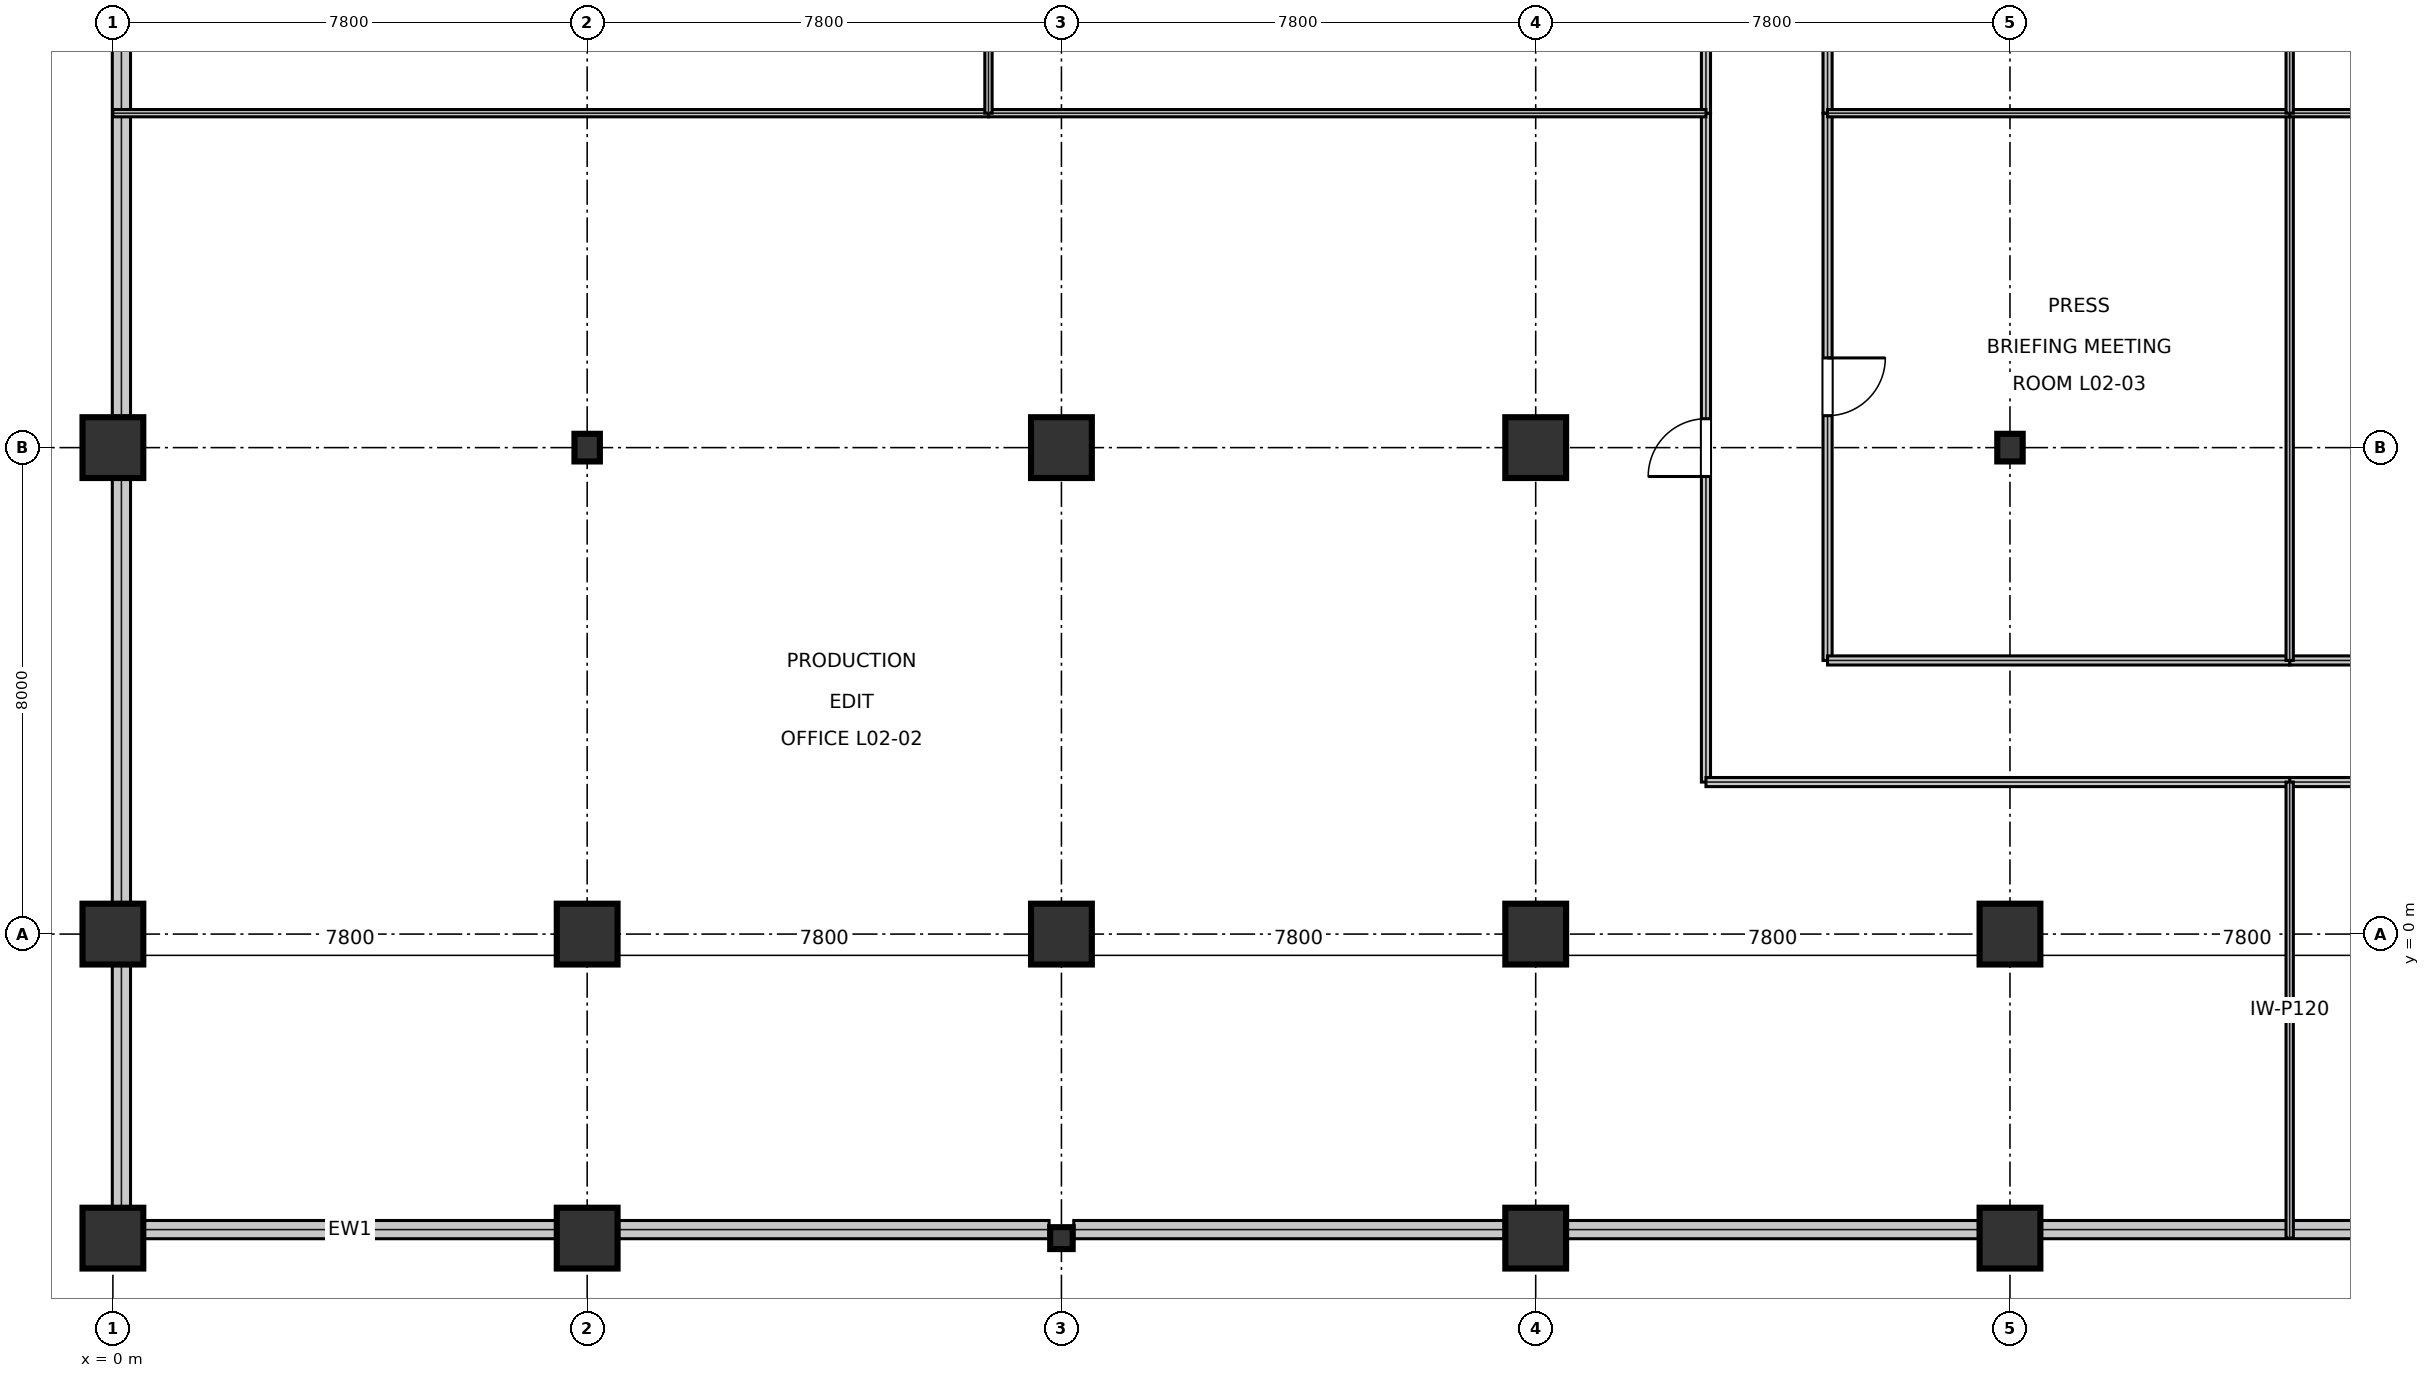
"""IFC4 building model, lengths in metres.
Left out: names, types, materials, properties, quantities, classifications, styles, units other than length and angle.
Written with IfcOpenShell. Run it as: python <this file> out.ifc"""

import sys

from ifc_helpers import new_model, si_unit, direction, frame, frame_2d, origin, origin_2d, place, context, subcontext, project, spatial, rectangle, i_section, extrude, element, fill, save


model = new_model("IFC4")
c1 = context("Model", 3, precision=1e-05, world=origin(), true_north=direction((0.0, 1.0)))
c2 = subcontext(c1, "Body", "Model", "MODEL_VIEW")
j1 = project(units=[si_unit("LENGTHUNIT", "METRE"), si_unit("PLANEANGLEUNIT", "RADIAN")], contexts=[c1])
p1 = place(None, origin())
s1 = spatial("IfcSite", under=j1, at=p1, CompositionType="ELEMENT")
p2 = place(p1, origin())
s2 = spatial("IfcBuilding", under=s1, at=p2, CompositionType="ELEMENT")
p3 = place(p2, frame((0.0, 0.0, 10.8)))
s3 = spatial("IfcBuildingStorey", under=s2, at=p3, CompositionType="ELEMENT", Elevation=10.8)
for number, where, z_axis, x_axis in (
    (1, (0.0, -5.0, 0.0), (0.0, 0.0, 1.0), (1.0, 0.0, 0.0)),
    (2, (0.0, 0.0, 0.0), (0.0, 0.0, 1.0), (1.0, 0.0, 0.0)),
    (3, (0.0, 8.0, 0.0), (0.0, 0.0, 1.0), (1.0, 0.0, 0.0)),
    (4, (7.8, -5.0, 0.0), (0.0, 0.0, 1.0), (1.0, 0.0, 0.0)),
    (5, (7.8, 0.0, 0.0), (0.0, 0.0, 1.0), (1.0, 0.0, 0.0)),
):
    element("IfcColumn", number, at=place(p3, frame(where, z_axis=z_axis, x_axis=x_axis)), inside=s3, PredefinedType="COLUMN", context=c2, shape_type="SweptSolid", body=[
        extrude(rectangle(XDim=1.0, YDim=1.0, at=origin_2d()), origin(), (0.0, 0.0, 1.0), 5.395),
    ])
p4 = place(p3, frame((7.8, 8.0, 0.0), z_axis=(0.0, 0.0, 1.0), x_axis=(1.0, 0.0, 0.0)))
e6 = element("IfcColumn", 6, at=p4, inside=s3, PredefinedType="COLUMN", context=c2, shape_type="SweptSolid", body=[
    extrude(i_section(OverallWidth=0.418, OverallDepth=0.455, WebThickness=0.042, FlangeThickness=0.068, at=origin_2d()), origin(), (0.0, 0.0, 1.0), 5.395),
])
p5 = place(p3, frame((15.6, -5.0, 0.0), z_axis=(0.0, 0.0, 1.0), x_axis=(1.0, 0.0, 0.0)))
e7 = element("IfcColumn", 7, at=p5, inside=s3, PredefinedType="COLUMN", context=c2, shape_type="SweptSolid", body=[
    extrude(i_section(OverallWidth=0.37, OverallDepth=0.36, WebThickness=0.012, FlangeThickness=0.02, at=origin_2d()), origin(), (0.0, 0.0, 1.0), 5.395),
])
for number, where, z_axis, x_axis in (
    (8, (15.6, 0.0, 0.0), (0.0, 0.0, 1.0), (1.0, 0.0, 0.0)),
    (9, (15.6, 8.0, 0.0), (0.0, 0.0, 1.0), (1.0, 0.0, 0.0)),
    (10, (23.4, -5.0, 0.0), (0.0, 0.0, 1.0), (1.0, 0.0, 0.0)),
    (11, (23.4, 0.0, 0.0), (0.0, 0.0, 1.0), (1.0, 0.0, 0.0)),
    (12, (23.4, 8.0, 0.0), (0.0, 0.0, 1.0), (1.0, 0.0, 0.0)),
    (13, (31.2, -5.0, 0.0), (0.0, 0.0, 1.0), (1.0, 0.0, 0.0)),
    (14, (31.2, 0.0, 0.0), (0.0, 0.0, 1.0), (1.0, 0.0, 0.0)),
):
    element("IfcColumn", number, at=place(p3, frame(where, z_axis=z_axis, x_axis=x_axis)), inside=s3, PredefinedType="COLUMN", context=c2, shape_type="SweptSolid", body=[
        extrude(rectangle(XDim=1.0, YDim=1.0, at=origin_2d()), origin(), (0.0, 0.0, 1.0), 5.395),
    ])
p6 = place(p3, frame((31.2, 8.0, 0.0), z_axis=(0.0, 0.0, 1.0), x_axis=(1.0, 0.0, 0.0)))
e15 = element("IfcColumn", 15, at=p6, inside=s3, PredefinedType="COLUMN", context=c2, shape_type="SweptSolid", body=[
    extrude(i_section(OverallWidth=0.418, OverallDepth=0.455, WebThickness=0.042, FlangeThickness=0.068, at=origin_2d()), origin(), (0.0, 0.0, 1.0), 5.395),
])
p7 = place(p3, frame((0.518, -4.86, 0.0), z_axis=(0.0, 0.0, 1.0), x_axis=(1.0, 0.0, 0.0)))
e16 = element("IfcWall", 16, at=p7, inside=s3, PredefinedType="STANDARD", context=c2, shape_type="SweptSolid", body=[
    extrude(rectangle(XDim=6.764, YDim=0.3, at=frame_2d((3.382, 0.0))), origin(), (0.0, 0.0, 1.0), 4.648),
])
p8 = place(p3, frame((8.318, -4.86, 0.0), z_axis=(0.0, 0.0, 1.0), x_axis=(1.0, 0.0, 0.0)))
e17 = element("IfcWall", 17, at=p8, inside=s3, PredefinedType="STANDARD", context=c2, shape_type="SweptSolid", body=[
    extrude(rectangle(XDim=7.079, YDim=0.3, at=frame_2d((3.54, 0.0))), origin(), (0.0, 0.0, 1.0), 4.648),
])
p9 = place(p3, frame((15.803, -4.86, 0.0), z_axis=(0.0, 0.0, 1.0), x_axis=(1.0, 0.0, 0.0)))
e18 = element("IfcWall", 18, at=p9, inside=s3, PredefinedType="STANDARD", context=c2, shape_type="SweptSolid", body=[
    extrude(rectangle(XDim=7.079, YDim=0.3, at=frame_2d((3.54, 0.0))), origin(), (0.0, 0.0, 1.0), 4.648),
])
for number, where, z_axis, x_axis in (
    (19, (23.918, -4.86, 0.0), (0.0, 0.0, 1.0), (1.0, 0.0, 0.0)),
    (20, (31.718, -4.86, 0.0), (0.0, 0.0, 1.0), (1.0, 0.0, 0.0)),
):
    element("IfcWall", number, at=place(p3, frame(where, z_axis=z_axis, x_axis=x_axis)), inside=s3, PredefinedType="STANDARD", context=c2, shape_type="SweptSolid", body=[
        extrude(rectangle(XDim=6.764, YDim=0.3, at=frame_2d((3.382, 0.0))), origin(), (0.0, 0.0, 1.0), 4.648),
    ])
for number, where, z_axis, x_axis in (
    (21, (0.14, 15.482, 0.0), (0.0, 0.0, 1.0), (0.0, -1.0, 0.0)),
    (22, (0.14, 7.482, 0.0), (0.0, 0.0, 1.0), (0.0, -1.0, 0.0)),
):
    element("IfcWall", number, at=place(p3, frame(where, z_axis=z_axis, x_axis=x_axis)), inside=s3, PredefinedType="STANDARD", context=c2, shape_type="SweptSolid", body=[
        extrude(rectangle(XDim=6.964, YDim=0.3, at=frame_2d((3.482, 0.0))), origin(), (0.0, 0.0, 1.0), 4.648),
    ])
p10 = place(p3, frame((0.14, -0.518, 0.0), z_axis=(0.0, 0.0, 1.0), x_axis=(0.0, -1.0, 0.0)))
e23 = element("IfcWall", 23, at=p10, inside=s3, PredefinedType="STANDARD", context=c2, shape_type="SweptSolid", body=[
    extrude(rectangle(XDim=3.964, YDim=0.3, at=frame_2d((1.982, 0.0))), origin(), (0.0, 0.0, 1.0), 4.648),
])
p11 = place(p3, frame((35.8, 2.5, 0.0), z_axis=(0.0, 0.0, 1.0), x_axis=(1.0, 0.0, 0.0)))
e24 = element("IfcWall", 24, at=p11, inside=s3, PredefinedType="PARTITIONING", context=c2, shape_type="SweptSolid", body=[
    extrude(rectangle(XDim=11.0, YDim=0.15, at=frame_2d((5.5, 0.0))), origin(), (0.0, 0.0, 1.0), 4.415),
])
p12 = place(p11, frame((5.025, 0.0, 0.0)))
e25 = element("IfcOpeningElement", 25, at=p12, cuts=e24, PredefinedType="OPENING", context=c2, shape_type="SweptSolid", body=[
    extrude(rectangle(XDim=0.95, YDim=2.15, at=frame_2d((0.475, 1.075))), frame((0.0, 0.085, 0.0), z_axis=(0.0, -1.0, 0.0), x_axis=(1.0, 0.0, 0.0)), (0.0, 0.0, 1.0), 0.17),
])
p13 = place(p3, frame((26.2, 2.5, 0.0), z_axis=(0.0, 0.0, 1.0), x_axis=(0.0, 1.0, 0.0)))
e26 = element("IfcWall", 26, at=p13, inside=s3, PredefinedType="PARTITIONING", context=c2, shape_type="SweptSolid", body=[
    extrude(rectangle(XDim=11.0, YDim=0.15, at=frame_2d((5.5, 0.0))), origin(), (0.0, 0.0, 1.0), 4.338),
])
p14 = place(p13, frame((5.025, 0.0, 0.0)))
e27 = element("IfcOpeningElement", 27, at=p14, cuts=e26, PredefinedType="OPENING", context=c2, shape_type="SweptSolid", body=[
    extrude(rectangle(XDim=0.95, YDim=2.15, at=frame_2d((0.475, 1.075))), frame((0.0, 0.085, 0.0), z_axis=(0.0, -1.0, 0.0), x_axis=(1.0, 0.0, 0.0)), (0.0, 0.0, 1.0), 0.17),
])
p15 = place(p3, frame((28.2, 4.5, 0.0), z_axis=(0.0, 0.0, 1.0), x_axis=(0.0, 1.0, 0.0)))
e28 = element("IfcWall", 28, at=p15, inside=s3, PredefinedType="PARTITIONING", context=c2, shape_type="SweptSolid", body=[
    extrude(rectangle(XDim=9.0, YDim=0.15, at=frame_2d((4.5, 0.0))), origin(), (0.0, 0.0, 1.0), 4.338),
])
p16 = place(p15, frame((4.025, 0.0, 0.0)))
e29 = element("IfcOpeningElement", 29, at=p16, cuts=e28, PredefinedType="OPENING", context=c2, shape_type="SweptSolid", body=[
    extrude(rectangle(XDim=0.95, YDim=2.15, at=frame_2d((0.475, 1.075))), frame((0.0, 0.085, 0.0), z_axis=(0.0, -1.0, 0.0), x_axis=(1.0, 0.0, 0.0)), (0.0, 0.0, 1.0), 0.17),
])
p17 = place(p3, frame((35.8, 4.5, 0.0), z_axis=(0.0, 0.0, 1.0), x_axis=(1.0, 0.0, 0.0)))
e30 = element("IfcWall", 30, at=p17, inside=s3, PredefinedType="PARTITIONING", context=c2, shape_type="SweptSolid", body=[
    extrude(rectangle(XDim=11.0, YDim=0.15, at=frame_2d((5.5, 0.0))), origin(), (0.0, 0.0, 1.0), 4.415),
])
p18 = place(p17, frame((5.025, 0.0, 0.0)))
e31 = element("IfcOpeningElement", 31, at=p18, cuts=e30, PredefinedType="OPENING", context=c2, shape_type="SweptSolid", body=[
    extrude(rectangle(XDim=0.95, YDim=2.15, at=frame_2d((0.475, 1.075))), frame((0.0, 0.085, 0.0), z_axis=(0.0, -1.0, 0.0), x_axis=(1.0, 0.0, 0.0)), (0.0, 0.0, 1.0), 0.17),
])
p19 = place(p3, frame((26.2, 13.5, 0.0), z_axis=(0.0, 0.0, 1.0), x_axis=(0.0, 1.0, 0.0)))
e32 = element("IfcWall", 32, at=p19, inside=s3, PredefinedType="PARTITIONING", context=c2, shape_type="SweptSolid", body=[
    extrude(rectangle(XDim=12.7, YDim=0.15, at=frame_2d((6.35, 0.0))), origin(), (0.0, 0.0, 1.0), 3.688),
])
p20 = place(p19, frame((5.875, 0.0, 0.0)))
e33 = element("IfcOpeningElement", 33, at=p20, cuts=e32, PredefinedType="OPENING", context=c2, shape_type="SweptSolid", body=[
    extrude(rectangle(XDim=0.95, YDim=2.15, at=frame_2d((0.475, 1.075))), frame((0.0, 0.085, 0.0), z_axis=(0.0, -1.0, 0.0), x_axis=(1.0, 0.0, 0.0)), (0.0, 0.0, 1.0), 0.17),
])
p21 = place(p3, frame((28.2, 13.5, 0.0), z_axis=(0.0, 0.0, 1.0), x_axis=(0.0, 1.0, 0.0)))
e34 = element("IfcWall", 34, at=p21, inside=s3, PredefinedType="PARTITIONING", context=c2, shape_type="SweptSolid", body=[
    extrude(rectangle(XDim=12.7, YDim=0.15, at=frame_2d((6.35, 0.0))), origin(), (0.0, 0.0, 1.0), 3.688),
])
p22 = place(p21, frame((5.875, 0.0, 0.0)))
e35 = element("IfcOpeningElement", 35, at=p22, cuts=e34, PredefinedType="OPENING", context=c2, shape_type="SweptSolid", body=[
    extrude(rectangle(XDim=0.95, YDim=2.15, at=frame_2d((0.475, 1.075))), frame((0.0, 0.085, 0.0), z_axis=(0.0, -1.0, 0.0), x_axis=(1.0, 0.0, 0.0)), (0.0, 0.0, 1.0), 0.17),
])
p23 = place(p3, frame((26.2, 2.5, 0.0), z_axis=(0.0, 0.0, 1.0), x_axis=(1.0, 0.0, 0.0)))
e36 = element("IfcWall", 36, at=p23, inside=s3, PredefinedType="PARTITIONING", context=c2, shape_type="SweptSolid", body=[
    extrude(rectangle(XDim=9.6, YDim=0.15, at=frame_2d((4.8, 0.0))), origin(), (0.0, 0.0, 1.0), 4.415),
])
p24 = place(p3, frame((28.2, 4.5, 0.0), z_axis=(0.0, 0.0, 1.0), x_axis=(1.0, 0.0, 0.0)))
e37 = element("IfcWall", 37, at=p24, inside=s3, PredefinedType="PARTITIONING", context=c2, shape_type="SweptSolid", body=[
    extrude(rectangle(XDim=7.6, YDim=0.15, at=frame_2d((3.8, 0.0))), origin(), (0.0, 0.0, 1.0), 4.415),
])
p25 = place(p3, frame((35.8, -5.0, 0.0), z_axis=(0.0, 0.0, 1.0), x_axis=(0.0, 1.0, 0.0)))
e38 = element("IfcWall", 38, at=p25, inside=s3, PredefinedType="PARTITIONING", context=c2, shape_type="SweptSolid", body=[
    extrude(rectangle(XDim=7.5, YDim=0.12, at=frame_2d((3.75, 0.0))), origin(), (0.0, 0.0, 1.0), 4.338),
])
p26 = place(p3, frame((14.4, 13.5, 0.0), z_axis=(0.0, 0.0, 1.0), x_axis=(1.0, 0.0, 0.0)))
e39 = element("IfcWall", 39, at=p26, inside=s3, PredefinedType="PARTITIONING", context=c2, shape_type="SweptSolid", body=[
    extrude(rectangle(XDim=11.8, YDim=0.12, at=frame_2d((5.9, 0.0))), origin(), (0.0, 0.0, 1.0), 3.688),
])
p27 = place(p3, frame((0.0, 13.5, 0.0), z_axis=(0.0, 0.0, 1.0), x_axis=(1.0, 0.0, 0.0)))
e40 = element("IfcWall", 40, at=p27, inside=s3, PredefinedType="PARTITIONING", context=c2, shape_type="SweptSolid", body=[
    extrude(rectangle(XDim=14.4, YDim=0.12, at=frame_2d((7.2, 0.0))), origin(), (0.0, 0.0, 1.0), 4.415),
])
p28 = place(p3, frame((35.8, 4.5, 0.0), z_axis=(0.0, 0.0, 1.0), x_axis=(0.0, 1.0, 0.0)))
e41 = element("IfcWall", 41, at=p28, inside=s3, PredefinedType="PARTITIONING", context=c2, shape_type="SweptSolid", body=[
    extrude(rectangle(XDim=9.0, YDim=0.12, at=frame_2d((4.5, 0.0))), origin(), (0.0, 0.0, 1.0), 4.338),
])
p29 = place(p3, frame((28.2, 13.5, 0.0), z_axis=(0.0, 0.0, 1.0), x_axis=(1.0, 0.0, 0.0)))
e42 = element("IfcWall", 42, at=p29, inside=s3, PredefinedType="PARTITIONING", context=c2, shape_type="SweptSolid", body=[
    extrude(rectangle(XDim=7.6, YDim=0.12, at=frame_2d((3.8, 0.0))), origin(), (0.0, 0.0, 1.0), 3.688),
])
p30 = place(p3, frame((35.8, 13.5, 0.0), z_axis=(0.0, 0.0, 1.0), x_axis=(1.0, 0.0, 0.0)))
e43 = element("IfcWall", 43, at=p30, inside=s3, PredefinedType="PARTITIONING", context=c2, shape_type="SweptSolid", body=[
    extrude(rectangle(XDim=11.0, YDim=0.12, at=frame_2d((5.5, 0.0))), origin(), (0.0, 0.0, 1.0), 4.415),
])
for number, where, z_axis, x_axis in (
    (44, (35.8, 13.5, 0.0), (0.0, 0.0, 1.0), (0.0, 1.0, 0.0)),
    (45, (14.4, 13.5, 0.0), (0.0, 0.0, 1.0), (0.0, 1.0, 0.0)),
):
    element("IfcWall", number, at=place(p3, frame(where, z_axis=z_axis, x_axis=x_axis)), inside=s3, PredefinedType="PARTITIONING", context=c2, shape_type="SweptSolid", body=[
        extrude(rectangle(XDim=12.7, YDim=0.12, at=frame_2d((6.35, 0.0))), origin(), (0.0, 0.0, 1.0), 3.688),
    ])
p31 = place(p14, origin())
e46 = element("IfcDoor", 46, at=p31, inside=s3, OperationType="SINGLE_SWING_LEFT", PredefinedType="DOOR", context=c2, shape_type="SweptSolid", body=[
    extrude(rectangle(XDim=0.95, YDim=2.15, at=frame_2d((0.475, 1.075))), frame((0.0, 0.025, 0.0), z_axis=(0.0, -1.0, 0.0), x_axis=(1.0, 0.0, 0.0)), (0.0, 0.0, 1.0), 0.05),
])
fill(e27, e46)
p32 = place(p16, frame((0.95, 0.0, 0.0), z_axis=(0.0, 0.0, 1.0), x_axis=(-1.0, 0.0, 0.0)))
e47 = element("IfcDoor", 47, at=p32, inside=s3, OperationType="SINGLE_SWING_LEFT", PredefinedType="DOOR", context=c2, shape_type="SweptSolid", body=[
    extrude(rectangle(XDim=0.95, YDim=2.15, at=frame_2d((0.475, 1.075))), frame((0.0, 0.025, 0.0), z_axis=(0.0, -1.0, 0.0), x_axis=(1.0, 0.0, 0.0)), (0.0, 0.0, 1.0), 0.05),
])
fill(e29, e47)
save(model, sys.argv[1])
